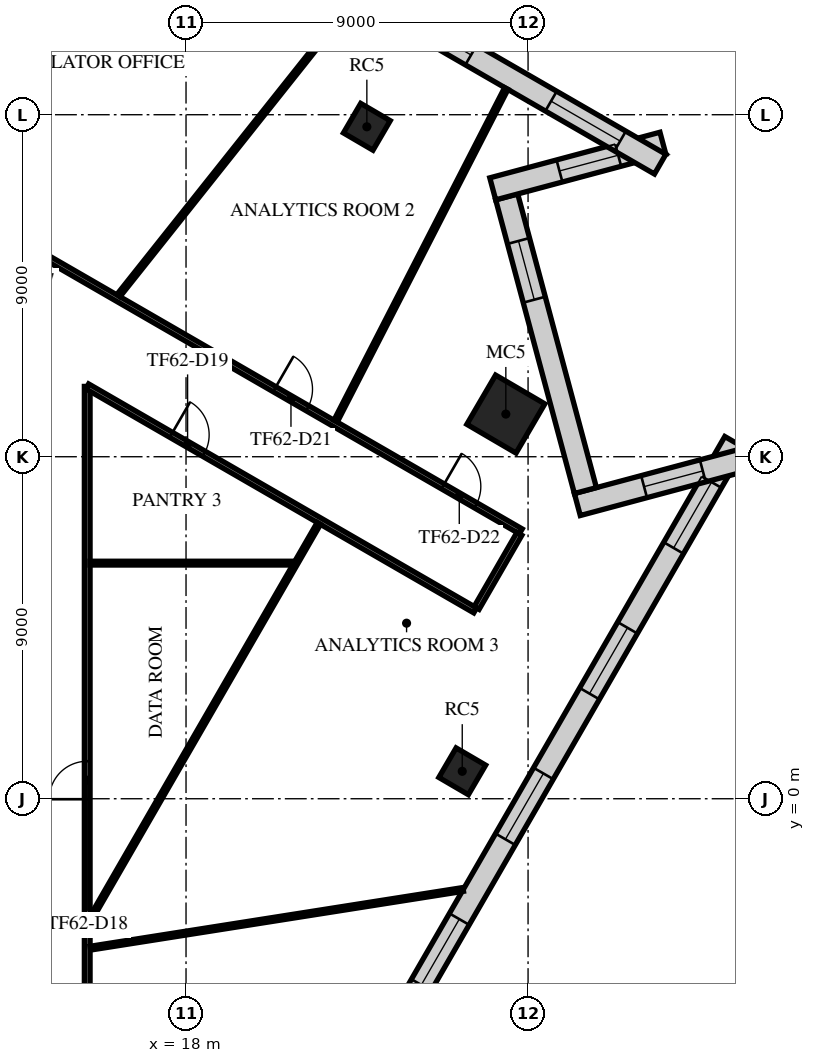
"""IFC4 building model, lengths in metres.
Left out: names, types, materials, properties, quantities, classifications, styles, units other than length and angle.
Written with IfcOpenShell. Run it as: python <this file> out.ifc"""

import sys

from ifc_helpers import new_model, si_unit, direction, frame, frame_2d, origin, origin_2d, place, context, subcontext, project, spatial, rectangle, extrude, element, fill, save


model = new_model("IFC4")
c1 = context("Model", 3, precision=1e-05, world=origin(), true_north=direction((0.0, 1.0)))
c2 = subcontext(c1, "Body", "Model", "MODEL_VIEW")
j1 = project(units=[si_unit("LENGTHUNIT", "METRE"), si_unit("PLANEANGLEUNIT", "RADIAN")], contexts=[c1])
p1 = place(None, origin())
s1 = spatial("IfcSite", under=j1, at=p1, CompositionType="ELEMENT")
p2 = place(p1, origin())
s2 = spatial("IfcBuilding", under=s1, at=p2, CompositionType="ELEMENT")
p3 = place(p2, frame((0.0, 0.0, 262.9)))
s3 = spatial("IfcBuildingStorey", under=s2, at=p3, CompositionType="ELEMENT", Elevation=262.9)
p4 = place(p3, frame((25.268, 0.722, 0.0), z_axis=(0.0, 0.0, 1.0), x_axis=(0.504643651291, 0.863327739165, 0.0)))
e1 = element("IfcColumn", 1, at=p4, inside=s3, PredefinedType="COLUMN", context=c2, shape_type="SweptSolid", body=[
    extrude(rectangle(XDim=0.9, YDim=0.9, at=origin_2d()), origin(), (0.0, 0.0, 1.0), 4.0),
])
p5 = place(p3, frame((26.415, 10.122, 0.0), z_axis=(0.0, 0.0, 1.0), x_axis=(0.504643651291, 0.863327739165, 0.0)))
e2 = element("IfcColumn", 2, at=p5, inside=s3, PredefinedType="COLUMN", context=c2, shape_type="SweptSolid", body=[
    extrude(rectangle(XDim=1.5, YDim=1.5, at=origin_2d()), origin(), (0.0, 0.0, 1.0), 4.0),
])
p6 = place(p3, frame((22.758, 17.682, 0.0), z_axis=(0.0, 0.0, 1.0), x_axis=(0.504643651291, 0.863327739165, 0.0)))
e3 = element("IfcColumn", 3, at=p6, inside=s3, PredefinedType="COLUMN", context=c2, shape_type="SweptSolid", body=[
    extrude(rectangle(XDim=0.9, YDim=0.9, at=origin_2d()), origin(), (0.0, 0.0, 1.0), 4.0),
])
p7 = place(p3, frame((8.094, -32.782, 0.0), z_axis=(0.0, 0.0, 1.0), x_axis=(0.499997945818, 0.866026589763, 0.0)))
e4 = element("IfcWall", 4, at=p7, inside=s3, PredefinedType="STANDARD", context=c2, shape_type="SweptSolid", body=[
    extrude(rectangle(XDim=48.686, YDim=0.6, at=frame_2d((24.343, 0.0))), origin(), (0.0, 0.0, 1.0), 3.64),
])
p8 = place(p7, frame((1.213, 0.0, 0.9)))
e5 = element("IfcOpeningElement", 5, at=p8, cuts=e4, PredefinedType="OPENING", context=c2, shape_type="SweptSolid", body=[
    extrude(rectangle(XDim=2.0, YDim=2.1, at=frame_2d((1.0, 1.05))), frame((0.0, 0.31, 0.0), z_axis=(0.0, -1.0, 0.0), x_axis=(1.0, 0.0, 0.0)), (0.0, 0.0, 1.0), 0.62),
])
p9 = place(p7, frame((5.639, 0.0, 0.9)))
e6 = element("IfcOpeningElement", 6, at=p9, cuts=e4, PredefinedType="OPENING", context=c2, shape_type="SweptSolid", body=[
    extrude(rectangle(XDim=2.0, YDim=2.1, at=frame_2d((1.0, 1.05))), frame((0.0, 0.31, 0.0), z_axis=(0.0, -1.0, 0.0), x_axis=(1.0, 0.0, 0.0)), (0.0, 0.0, 1.0), 0.62),
])
p10 = place(p7, frame((10.065, 0.0, 0.9)))
e7 = element("IfcOpeningElement", 7, at=p10, cuts=e4, PredefinedType="OPENING", context=c2, shape_type="SweptSolid", body=[
    extrude(rectangle(XDim=2.0, YDim=2.1, at=frame_2d((1.0, 1.05))), frame((0.0, 0.31, 0.0), z_axis=(0.0, -1.0, 0.0), x_axis=(1.0, 0.0, 0.0)), (0.0, 0.0, 1.0), 0.62),
])
p11 = place(p7, frame((14.491, 0.0, 0.9)))
e8 = element("IfcOpeningElement", 8, at=p11, cuts=e4, PredefinedType="OPENING", context=c2, shape_type="SweptSolid", body=[
    extrude(rectangle(XDim=2.0, YDim=2.1, at=frame_2d((1.0, 1.05))), frame((0.0, 0.31, 0.0), z_axis=(0.0, -1.0, 0.0), x_axis=(1.0, 0.0, 0.0)), (0.0, 0.0, 1.0), 0.62),
])
p12 = place(p7, frame((18.917, 0.0, 0.9)))
e9 = element("IfcOpeningElement", 9, at=p12, cuts=e4, PredefinedType="OPENING", context=c2, shape_type="SweptSolid", body=[
    extrude(rectangle(XDim=2.0, YDim=2.1, at=frame_2d((1.0, 1.05))), frame((0.0, 0.31, 0.0), z_axis=(0.0, -1.0, 0.0), x_axis=(1.0, 0.0, 0.0)), (0.0, 0.0, 1.0), 0.62),
])
p13 = place(p7, frame((23.343, 0.0, 0.9)))
e10 = element("IfcOpeningElement", 10, at=p13, cuts=e4, PredefinedType="OPENING", context=c2, shape_type="SweptSolid", body=[
    extrude(rectangle(XDim=2.0, YDim=2.1, at=frame_2d((1.0, 1.05))), frame((0.0, 0.31, 0.0), z_axis=(0.0, -1.0, 0.0), x_axis=(1.0, 0.0, 0.0)), (0.0, 0.0, 1.0), 0.62),
])
p14 = place(p7, frame((27.769, 0.0, 0.9)))
e11 = element("IfcOpeningElement", 11, at=p14, cuts=e4, PredefinedType="OPENING", context=c2, shape_type="SweptSolid", body=[
    extrude(rectangle(XDim=2.0, YDim=2.1, at=frame_2d((1.0, 1.05))), frame((0.0, 0.31, 0.0), z_axis=(0.0, -1.0, 0.0), x_axis=(1.0, 0.0, 0.0)), (0.0, 0.0, 1.0), 0.62),
])
p15 = place(p7, frame((32.195, 0.0, 0.9)))
e12 = element("IfcOpeningElement", 12, at=p15, cuts=e4, PredefinedType="OPENING", context=c2, shape_type="SweptSolid", body=[
    extrude(rectangle(XDim=2.0, YDim=2.1, at=frame_2d((1.0, 1.05))), frame((0.0, 0.31, 0.0), z_axis=(0.0, -1.0, 0.0), x_axis=(1.0, 0.0, 0.0)), (0.0, 0.0, 1.0), 0.62),
])
p16 = place(p7, frame((36.621, 0.0, 0.9)))
e13 = element("IfcOpeningElement", 13, at=p16, cuts=e4, PredefinedType="OPENING", context=c2, shape_type="SweptSolid", body=[
    extrude(rectangle(XDim=2.0, YDim=2.1, at=frame_2d((1.0, 1.05))), frame((0.0, 0.31, 0.0), z_axis=(0.0, -1.0, 0.0), x_axis=(1.0, 0.0, 0.0)), (0.0, 0.0, 1.0), 0.62),
])
p17 = place(p7, frame((41.047, 0.0, 0.9)))
e14 = element("IfcOpeningElement", 14, at=p17, cuts=e4, PredefinedType="OPENING", context=c2, shape_type="SweptSolid", body=[
    extrude(rectangle(XDim=2.0, YDim=2.1, at=frame_2d((1.0, 1.05))), frame((0.0, 0.31, 0.0), z_axis=(0.0, -1.0, 0.0), x_axis=(1.0, 0.0, 0.0)), (0.0, 0.0, 1.0), 0.62),
])
p18 = place(p7, frame((45.473, 0.0, 0.9)))
e15 = element("IfcOpeningElement", 15, at=p18, cuts=e4, PredefinedType="OPENING", context=c2, shape_type="SweptSolid", body=[
    extrude(rectangle(XDim=2.0, YDim=2.1, at=frame_2d((1.0, 1.05))), frame((0.0, 0.31, 0.0), z_axis=(0.0, -1.0, 0.0), x_axis=(1.0, 0.0, 0.0)), (0.0, 0.0, 1.0), 0.62),
])
p19 = place(p3, frame((32.774, 8.942, 0.0), z_axis=(0.0, 0.0, 1.0), x_axis=(-0.965928304125, -0.258809797517, 0.0)))
e16 = element("IfcWall", 16, at=p19, inside=s3, PredefinedType="STANDARD", context=c2, shape_type="SweptSolid", body=[
    extrude(rectangle(XDim=4.635, YDim=0.6, at=frame_2d((2.318, 0.0))), origin(), (0.0, 0.0, 1.0), 3.64),
])
p20 = place(p19, frame((1.218, 0.0, 0.9)))
e17 = element("IfcOpeningElement", 17, at=p20, cuts=e16, PredefinedType="OPENING", context=c2, shape_type="SweptSolid", body=[
    extrude(rectangle(XDim=1.6, YDim=2.1, at=frame_2d((0.8, 1.05))), frame((0.0, 0.31, 0.0), z_axis=(0.0, -1.0, 0.0), x_axis=(1.0, 0.0, 0.0)), (0.0, 0.0, 1.0), 0.62),
])
p21 = place(p3, frame((28.509, 8.11, 0.0), z_axis=(0.0, 0.0, 1.0), x_axis=(-0.258815405168, 0.965926801599, 0.0)))
e18 = element("IfcWall", 18, at=p21, inside=s3, PredefinedType="STANDARD", context=c2, shape_type="SweptSolid", body=[
    extrude(rectangle(XDim=8.0, YDim=0.6, at=frame_2d((4.0, 0.0))), origin(), (0.0, 0.0, 1.0), 3.64),
])
p22 = place(p21, frame((5.2, 0.0, 0.9)))
e19 = element("IfcOpeningElement", 19, at=p22, cuts=e18, PredefinedType="OPENING", context=c2, shape_type="SweptSolid", body=[
    extrude(rectangle(XDim=1.6, YDim=2.1, at=frame_2d((0.8, 1.05))), frame((0.0, 0.31, 0.0), z_axis=(0.0, -1.0, 0.0), x_axis=(1.0, 0.0, 0.0)), (0.0, 0.0, 1.0), 0.62),
])
p23 = place(p3, frame((26.071, 16.049, 0.0), z_axis=(0.0, 0.0, 1.0), x_axis=(0.965928304125, 0.258809797517, 0.0)))
e20 = element("IfcWall", 20, at=p23, inside=s3, PredefinedType="STANDARD", context=c2, shape_type="SweptSolid", body=[
    extrude(rectangle(XDim=4.635, YDim=0.6, at=frame_2d((2.318, 0.0))), origin(), (0.0, 0.0, 1.0), 3.64),
])
p24 = place(p23, frame((1.818, 0.0, 0.9)))
e21 = element("IfcOpeningElement", 21, at=p24, cuts=e20, PredefinedType="OPENING", context=c2, shape_type="SweptSolid", body=[
    extrude(rectangle(XDim=1.6, YDim=2.1, at=frame_2d((0.8, 1.05))), frame((0.0, 0.31, 0.0), z_axis=(0.0, -1.0, 0.0), x_axis=(1.0, 0.0, 0.0)), (0.0, 0.0, 1.0), 0.62),
])
p25 = place(p3, frame((30.476, 16.699, 0.0), z_axis=(0.0, 0.0, 1.0), x_axis=(-0.866025061514, 0.500000592829, 0.0)))
e22 = element("IfcWall", 22, at=p25, inside=s3, PredefinedType="STANDARD", context=c2, shape_type="SweptSolid", body=[
    extrude(rectangle(XDim=36.243, YDim=0.6, at=frame_2d((18.122, 0.0))), origin(), (0.0, 0.0, 1.0), 3.64),
])
p26 = place(p25, frame((1.215, 0.0, 0.9)))
e23 = element("IfcOpeningElement", 23, at=p26, cuts=e22, PredefinedType="OPENING", context=c2, shape_type="SweptSolid", body=[
    extrude(rectangle(XDim=2.1, YDim=2.1, at=frame_2d((1.05, 1.05))), frame((0.0, 0.31, 0.0), z_axis=(0.0, -1.0, 0.0), x_axis=(1.0, 0.0, 0.0)), (0.0, 0.0, 1.0), 0.62),
])
p27 = place(p25, frame((5.746, 0.0, 0.9)))
e24 = element("IfcOpeningElement", 24, at=p27, cuts=e22, PredefinedType="OPENING", context=c2, shape_type="SweptSolid", body=[
    extrude(rectangle(XDim=2.1, YDim=2.1, at=frame_2d((1.05, 1.05))), frame((0.0, 0.31, 0.0), z_axis=(0.0, -1.0, 0.0), x_axis=(1.0, 0.0, 0.0)), (0.0, 0.0, 1.0), 0.62),
])
p28 = place(p25, frame((10.276, 0.0, 0.9)))
e25 = element("IfcOpeningElement", 25, at=p28, cuts=e22, PredefinedType="OPENING", context=c2, shape_type="SweptSolid", body=[
    extrude(rectangle(XDim=2.1, YDim=2.1, at=frame_2d((1.05, 1.05))), frame((0.0, 0.31, 0.0), z_axis=(0.0, -1.0, 0.0), x_axis=(1.0, 0.0, 0.0)), (0.0, 0.0, 1.0), 0.62),
])
p29 = place(p25, frame((14.806, 0.0, 0.9)))
e26 = element("IfcOpeningElement", 26, at=p29, cuts=e22, PredefinedType="OPENING", context=c2, shape_type="SweptSolid", body=[
    extrude(rectangle(XDim=2.1, YDim=2.1, at=frame_2d((1.05, 1.05))), frame((0.0, 0.31, 0.0), z_axis=(0.0, -1.0, 0.0), x_axis=(1.0, 0.0, 0.0)), (0.0, 0.0, 1.0), 0.62),
])
p30 = place(p25, frame((19.337, 0.0, 0.9)))
e27 = element("IfcOpeningElement", 27, at=p30, cuts=e22, PredefinedType="OPENING", context=c2, shape_type="SweptSolid", body=[
    extrude(rectangle(XDim=2.1, YDim=2.1, at=frame_2d((1.05, 1.05))), frame((0.0, 0.31, 0.0), z_axis=(0.0, -1.0, 0.0), x_axis=(1.0, 0.0, 0.0)), (0.0, 0.0, 1.0), 0.62),
])
p31 = place(p25, frame((23.867, 0.0, 0.9)))
e28 = element("IfcOpeningElement", 28, at=p31, cuts=e22, PredefinedType="OPENING", context=c2, shape_type="SweptSolid", body=[
    extrude(rectangle(XDim=2.1, YDim=2.1, at=frame_2d((1.05, 1.05))), frame((0.0, 0.31, 0.0), z_axis=(0.0, -1.0, 0.0), x_axis=(1.0, 0.0, 0.0)), (0.0, 0.0, 1.0), 0.62),
])
p32 = place(p25, frame((28.398, 0.0, 0.9)))
e29 = element("IfcOpeningElement", 29, at=p32, cuts=e22, PredefinedType="OPENING", context=c2, shape_type="SweptSolid", body=[
    extrude(rectangle(XDim=2.1, YDim=2.1, at=frame_2d((1.05, 1.05))), frame((0.0, 0.31, 0.0), z_axis=(0.0, -1.0, 0.0), x_axis=(1.0, 0.0, 0.0)), (0.0, 0.0, 1.0), 0.62),
])
p33 = place(p25, frame((32.928, 0.0, 0.9)))
e30 = element("IfcOpeningElement", 30, at=p33, cuts=e22, PredefinedType="OPENING", context=c2, shape_type="SweptSolid", body=[
    extrude(rectangle(XDim=2.1, YDim=2.1, at=frame_2d((1.05, 1.05))), frame((0.0, 0.31, 0.0), z_axis=(0.0, -1.0, 0.0), x_axis=(1.0, 0.0, 0.0)), (0.0, 0.0, 1.0), 0.62),
])
p34 = place(p3, frame((-7.247, 26.698, 0.0), z_axis=(0.0, 0.0, 1.0), x_axis=(0.866022442497, -0.500005129065, 0.0)))
e31 = element("IfcWall", 31, at=p34, inside=s3, PredefinedType="PARTITIONING", context=c2, shape_type="SweptSolid", body=[
    extrude(rectangle(XDim=39.325, YDim=0.15, at=frame_2d((19.662, 0.0))), origin(), (0.0, 0.0, 1.0), 3.04),
])
p35 = place(p34, frame((15.654, 0.0, 0.0)))
e32 = element("IfcOpeningElement", 32, at=p35, cuts=e31, PredefinedType="OPENING", context=c2, shape_type="SweptSolid", body=[
    extrude(rectangle(XDim=1.0, YDim=2.1, at=frame_2d((0.5, 1.05))), frame((0.0, 0.085, 0.0), z_axis=(0.0, -1.0, 0.0), x_axis=(1.0, 0.0, 0.0)), (0.0, 0.0, 1.0), 0.17),
])
p36 = place(p34, frame((23.442, 0.0, 0.0)))
e33 = element("IfcOpeningElement", 33, at=p36, cuts=e31, PredefinedType="OPENING", context=c2, shape_type="SweptSolid", body=[
    extrude(rectangle(XDim=1.0, YDim=2.1, at=frame_2d((0.5, 1.05))), frame((0.0, 0.085, 0.0), z_axis=(0.0, -1.0, 0.0), x_axis=(1.0, 0.0, 0.0)), (0.0, 0.0, 1.0), 0.17),
])
p37 = place(p34, frame((31.841, 0.0, 0.0)))
e34 = element("IfcOpeningElement", 34, at=p37, cuts=e31, PredefinedType="OPENING", context=c2, shape_type="SweptSolid", body=[
    extrude(rectangle(XDim=1.0, YDim=2.1, at=frame_2d((0.5, 1.05))), frame((0.0, 0.085, 0.0), z_axis=(0.0, -1.0, 0.0), x_axis=(1.0, 0.0, 0.0)), (0.0, 0.0, 1.0), 0.17),
])
p38 = place(p34, frame((36.955, 0.0, 0.0)))
e35 = element("IfcOpeningElement", 35, at=p38, cuts=e31, PredefinedType="OPENING", context=c2, shape_type="SweptSolid", body=[
    extrude(rectangle(XDim=1.0, YDim=2.1, at=frame_2d((0.5, 1.05))), frame((0.0, 0.085, 0.0), z_axis=(0.0, -1.0, 0.0), x_axis=(1.0, 0.0, 0.0)), (0.0, 0.0, 1.0), 0.17),
])
p39 = place(p3, frame((15.4, -15.325, 0.0), z_axis=(0.0, 0.0, 1.0), x_axis=(0.0, 1.0, 0.0)))
e36 = element("IfcWall", 36, at=p39, inside=s3, PredefinedType="PARTITIONING", context=c2, shape_type="SweptSolid", body=[
    extrude(rectangle(XDim=26.175, YDim=0.15, at=frame_2d((13.087, 0.0))), origin(), (0.0, 0.0, 1.0), 3.24),
])
p40 = place(p39, frame((15.312, 0.0, 0.0)))
e37 = element("IfcOpeningElement", 37, at=p40, cuts=e36, PredefinedType="OPENING", context=c2, shape_type="SweptSolid", body=[
    extrude(rectangle(XDim=1.0, YDim=2.1, at=frame_2d((0.5, 1.05))), frame((0.0, 0.085, 0.0), z_axis=(0.0, -1.0, 0.0), x_axis=(1.0, 0.0, 0.0)), (0.0, 0.0, 1.0), 0.17),
])
p41 = place(p39, frame((4.619, 0.0, 0.0)))
e38 = element("IfcOpeningElement", 38, at=p41, cuts=e36, PredefinedType="OPENING", context=c2, shape_type="SweptSolid", body=[
    extrude(rectangle(XDim=1.0, YDim=2.1, at=frame_2d((0.5, 1.05))), frame((0.0, 0.085, 0.0), z_axis=(0.0, -1.0, 0.0), x_axis=(1.0, 0.0, 0.0)), (0.0, 0.0, 1.0), 0.17),
])
p42 = place(p3, frame((15.4, 10.851, 0.0), z_axis=(0.0, 0.0, 1.0), x_axis=(0.865993826089, -0.500054690184, 0.0)))
e39 = element("IfcWall", 39, at=p42, inside=s3, PredefinedType="PARTITIONING", context=c2, shape_type="SweptSolid", body=[
    extrude(rectangle(XDim=11.789, YDim=0.15, at=frame_2d((5.895, 0.0))), origin(), (0.0, 0.0, 1.0), 3.04),
])
p43 = place(p42, frame((2.55, 0.0, 0.0)))
e40 = element("IfcOpeningElement", 40, at=p43, cuts=e39, PredefinedType="OPENING", context=c2, shape_type="SweptSolid", body=[
    extrude(rectangle(XDim=1.0, YDim=2.1, at=frame_2d((0.5, 1.05))), frame((0.0, 0.085, 0.0), z_axis=(0.0, -1.0, 0.0), x_axis=(1.0, 0.0, 0.0)), (0.0, 0.0, 1.0), 0.17),
])
p44 = place(p3, frame((25.646, 5.021, 0.0), z_axis=(0.0, 0.0, 1.0), x_axis=(0.499919672301, 0.866071776036, 0.0)))
e41 = element("IfcWall", 41, at=p44, inside=s3, PredefinedType="PARTITIONING", context=c2, shape_type="SweptSolid", body=[
    extrude(rectangle(XDim=2.25, YDim=0.15, at=frame_2d((1.125, 0.0))), origin(), (0.0, 0.0, 1.0), 3.04),
])
p45 = place(p3, frame((8.728, 17.567, 0.0), z_axis=(0.0, 0.0, 1.0), x_axis=(0.591764258376, 0.806111073307, 0.0)))
e42 = element("IfcWall", 42, at=p45, inside=s3, PredefinedType="PARTITIONING", context=c2, shape_type="SweptSolid", body=[
    extrude(rectangle(XDim=9.88, YDim=0.1, at=frame_2d((4.94, 0.0))), origin(), (0.0, 0.0, 1.0), 3.04),
])
p46 = place(p3, frame((15.475, 6.2, 0.0), z_axis=(0.0, 0.0, 1.0), x_axis=(1.0, 0.0, 0.0)))
e43 = element("IfcWall", 43, at=p46, inside=s3, PredefinedType="PARTITIONING", context=c2, shape_type="SweptSolid", body=[
    extrude(rectangle(XDim=5.33, YDim=0.1, at=frame_2d((2.665, 0.0))), origin(), (0.0, 0.0, 1.0), 3.64),
])
p47 = place(p3, frame((15.483, -3.932, 0.0), z_axis=(0.0, 0.0, 1.0), x_axis=(0.987819108506, 0.155606583636, 0.0)))
e44 = element("IfcWall", 44, at=p47, inside=s3, PredefinedType="PARTITIONING", context=c2, shape_type="SweptSolid", body=[
    extrude(rectangle(XDim=9.932, YDim=0.1, at=frame_2d((4.966, 0.0))), origin(), (0.0, 0.0, 1.0), 3.04),
])
p48 = place(p3, frame((15.518, -3.108, 0.0), z_axis=(0.0, 0.0, 1.0), x_axis=(0.499989387739, 0.866031530689, 0.0)))
e45 = element("IfcWall", 45, at=p48, inside=s3, PredefinedType="PARTITIONING", context=c2, shape_type="SweptSolid", body=[
    extrude(rectangle(XDim=11.955, YDim=0.1, at=frame_2d((5.978, 0.0))), origin(), (0.0, 0.0, 1.0), 3.24),
])
p49 = place(p3, frame((16.223, 13.242, 0.0), z_axis=(0.0, 0.0, 1.0), x_axis=(0.622346910835, 0.78274154264, 0.0)))
e46 = element("IfcWall", 46, at=p49, inside=s3, PredefinedType="PARTITIONING", context=c2, shape_type="SweptSolid", body=[
    extrude(rectangle(XDim=9.927, YDim=0.1, at=frame_2d((4.964, 0.0))), origin(), (0.0, 0.0, 1.0), 3.04),
])
p50 = place(p3, frame((21.936, 9.938, 0.0), z_axis=(0.0, 0.0, 1.0), x_axis=(0.456562052213, 0.889691571545, 0.0)))
e47 = element("IfcWall", 47, at=p50, inside=s3, PredefinedType="PARTITIONING", context=c2, shape_type="SweptSolid", body=[
    extrude(rectangle(XDim=9.835, YDim=0.1, at=frame_2d((4.918, 0.0))), origin(), (0.0, 0.0, 1.0), 3.04),
])
p51 = place(p15, origin())
e48 = element("IfcWindow", 48, at=p51, inside=s3, PartitioningType="SINGLE_PANEL", PredefinedType="WINDOW", context=c2, shape_type="SweptSolid", body=[
    extrude(rectangle(XDim=2.0, YDim=2.1, at=frame_2d((1.0, 1.05))), frame((0.0, 0.03, 0.0), z_axis=(0.0, -1.0, 0.0), x_axis=(1.0, 0.0, 0.0)), (0.0, 0.0, 1.0), 0.06),
])
fill(e12, e48)
p52 = place(p16, origin())
e49 = element("IfcWindow", 49, at=p52, inside=s3, PartitioningType="SINGLE_PANEL", PredefinedType="WINDOW", context=c2, shape_type="SweptSolid", body=[
    extrude(rectangle(XDim=2.0, YDim=2.1, at=frame_2d((1.0, 1.05))), frame((0.0, 0.03, 0.0), z_axis=(0.0, -1.0, 0.0), x_axis=(1.0, 0.0, 0.0)), (0.0, 0.0, 1.0), 0.06),
])
fill(e13, e49)
p53 = place(p17, origin())
e50 = element("IfcWindow", 50, at=p53, inside=s3, PartitioningType="SINGLE_PANEL", PredefinedType="WINDOW", context=c2, shape_type="SweptSolid", body=[
    extrude(rectangle(XDim=2.0, YDim=2.1, at=frame_2d((1.0, 1.05))), frame((0.0, 0.03, 0.0), z_axis=(0.0, -1.0, 0.0), x_axis=(1.0, 0.0, 0.0)), (0.0, 0.0, 1.0), 0.06),
])
fill(e14, e50)
p54 = place(p18, origin())
e51 = element("IfcWindow", 51, at=p54, inside=s3, PartitioningType="SINGLE_PANEL", PredefinedType="WINDOW", context=c2, shape_type="SweptSolid", body=[
    extrude(rectangle(XDim=2.0, YDim=2.1, at=frame_2d((1.0, 1.05))), frame((0.0, 0.03, 0.0), z_axis=(0.0, -1.0, 0.0), x_axis=(1.0, 0.0, 0.0)), (0.0, 0.0, 1.0), 0.06),
])
fill(e15, e51)
p55 = place(p20, origin())
e52 = element("IfcWindow", 52, at=p55, inside=s3, PartitioningType="SINGLE_PANEL", PredefinedType="WINDOW", context=c2, shape_type="SweptSolid", body=[
    extrude(rectangle(XDim=1.6, YDim=2.1, at=frame_2d((0.8, 1.05))), frame((0.0, 0.03, 0.0), z_axis=(0.0, -1.0, 0.0), x_axis=(1.0, 0.0, 0.0)), (0.0, 0.0, 1.0), 0.06),
])
fill(e17, e52)
p56 = place(p22, origin())
e53 = element("IfcWindow", 53, at=p56, inside=s3, PartitioningType="SINGLE_PANEL", PredefinedType="WINDOW", context=c2, shape_type="SweptSolid", body=[
    extrude(rectangle(XDim=1.6, YDim=2.1, at=frame_2d((0.8, 1.05))), frame((0.0, 0.03, 0.0), z_axis=(0.0, -1.0, 0.0), x_axis=(1.0, 0.0, 0.0)), (0.0, 0.0, 1.0), 0.06),
])
fill(e19, e53)
p57 = place(p24, origin())
e54 = element("IfcWindow", 54, at=p57, inside=s3, PartitioningType="SINGLE_PANEL", PredefinedType="WINDOW", context=c2, shape_type="SweptSolid", body=[
    extrude(rectangle(XDim=1.6, YDim=2.1, at=frame_2d((0.8, 1.05))), frame((0.0, 0.03, 0.0), z_axis=(0.0, -1.0, 0.0), x_axis=(1.0, 0.0, 0.0)), (0.0, 0.0, 1.0), 0.06),
])
fill(e21, e54)
p58 = place(p26, origin())
e55 = element("IfcWindow", 55, at=p58, inside=s3, PartitioningType="SINGLE_PANEL", PredefinedType="WINDOW", context=c2, shape_type="SweptSolid", body=[
    extrude(rectangle(XDim=2.1, YDim=2.1, at=frame_2d((1.05, 1.05))), frame((0.0, 0.03, 0.0), z_axis=(0.0, -1.0, 0.0), x_axis=(1.0, 0.0, 0.0)), (0.0, 0.0, 1.0), 0.06),
])
fill(e23, e55)
p59 = place(p27, origin())
e56 = element("IfcWindow", 56, at=p59, inside=s3, PartitioningType="SINGLE_PANEL", PredefinedType="WINDOW", context=c2, shape_type="SweptSolid", body=[
    extrude(rectangle(XDim=2.1, YDim=2.1, at=frame_2d((1.05, 1.05))), frame((0.0, 0.03, 0.0), z_axis=(0.0, -1.0, 0.0), x_axis=(1.0, 0.0, 0.0)), (0.0, 0.0, 1.0), 0.06),
])
fill(e24, e56)
p60 = place(p40, frame((1.0, 0.0, 0.0), z_axis=(0.0, 0.0, 1.0), x_axis=(-1.0, 0.0, 0.0)))
e57 = element("IfcDoor", 57, at=p60, inside=s3, OperationType="SINGLE_SWING_LEFT", PredefinedType="DOOR", context=c2, shape_type="SweptSolid", body=[
    extrude(rectangle(XDim=1.0, YDim=2.1, at=frame_2d((0.5, 1.05))), frame((0.0, 0.025, 0.0), z_axis=(0.0, -1.0, 0.0), x_axis=(1.0, 0.0, 0.0)), (0.0, 0.0, 1.0), 0.05),
])
fill(e37, e57)
p61 = place(p43, frame((1.0, 0.0, 0.0), z_axis=(0.0, 0.0, 1.0), x_axis=(-1.0, 0.0, 0.0)))
e58 = element("IfcDoor", 58, at=p61, inside=s3, OperationType="SINGLE_SWING_LEFT", PredefinedType="DOOR", context=c2, shape_type="SweptSolid", body=[
    extrude(rectangle(XDim=1.0, YDim=2.1, at=frame_2d((0.5, 1.05))), frame((0.0, 0.025, 0.0), z_axis=(0.0, -1.0, 0.0), x_axis=(1.0, 0.0, 0.0)), (0.0, 0.0, 1.0), 0.05),
])
fill(e40, e58)
p62 = place(p37, origin())
e59 = element("IfcDoor", 59, at=p62, inside=s3, OperationType="SINGLE_SWING_RIGHT", PredefinedType="DOOR", context=c2, shape_type="SweptSolid", body=[
    extrude(rectangle(XDim=1.0, YDim=2.1, at=frame_2d((0.5, 1.05))), frame((0.0, 0.025, 0.0), z_axis=(0.0, -1.0, 0.0), x_axis=(1.0, 0.0, 0.0)), (0.0, 0.0, 1.0), 0.05),
])
fill(e34, e59)
p63 = place(p38, origin())
e60 = element("IfcDoor", 60, at=p63, inside=s3, OperationType="SINGLE_SWING_RIGHT", PredefinedType="DOOR", context=c2, shape_type="SweptSolid", body=[
    extrude(rectangle(XDim=1.0, YDim=2.1, at=frame_2d((0.5, 1.05))), frame((0.0, 0.025, 0.0), z_axis=(0.0, -1.0, 0.0), x_axis=(1.0, 0.0, 0.0)), (0.0, 0.0, 1.0), 0.05),
])
fill(e35, e60)
save(model, sys.argv[1])
